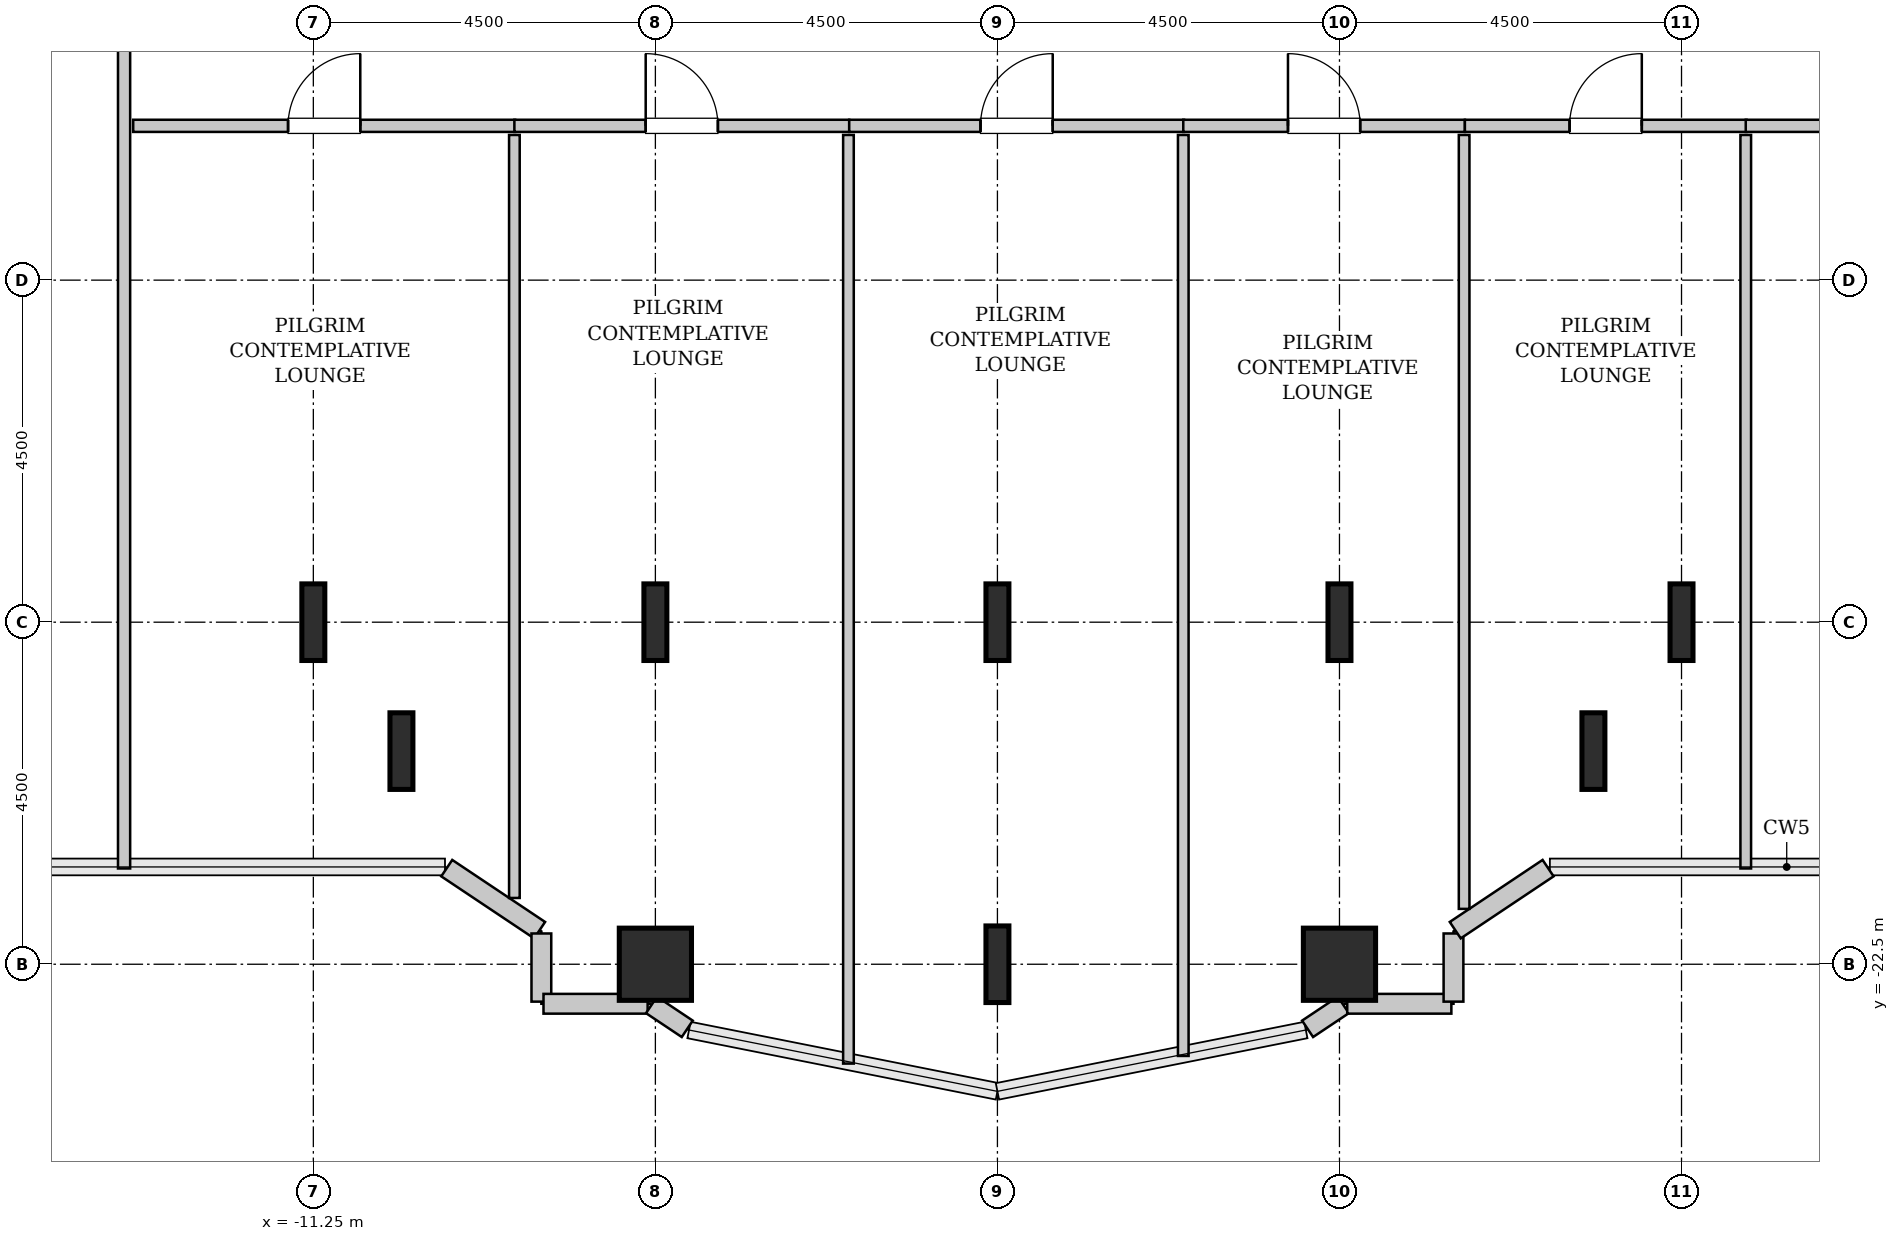
"""IFC4 building model, lengths in metres.
Left out: names, types, materials, properties, quantities, classifications, styles, units other than length and angle.
Written with IfcOpenShell. Run it as: python <this file> out.ifc"""

import sys

from ifc_helpers import new_model, si_unit, direction, frame, frame_2d, origin, origin_2d, place, context, subcontext, project, spatial, rectangle, hollow_rectangle, i_section, extrude, source, transform, mapped, element, fill, save


model = new_model("IFC4")
c1 = context("Model", 3, precision=1e-05, world=origin(), true_north=direction((0.0, 1.0)))
c2 = subcontext(c1, "Body", "Model", "MODEL_VIEW")
j1 = project(units=[si_unit("LENGTHUNIT", "METRE"), si_unit("PLANEANGLEUNIT", "RADIAN")], contexts=[c1])
p1 = place(None, origin())
s1 = spatial("IfcSite", under=j1, at=p1, CompositionType="ELEMENT")
p2 = place(p1, origin())
s2 = spatial("IfcBuilding", under=s1, at=p2, CompositionType="ELEMENT")
p3 = place(p2, frame((0.0, 0.0, 52.0)))
s3 = spatial("IfcBuildingStorey", under=s2, at=p3, CompositionType="ELEMENT", Elevation=52.0)
m1 = source(origin(), c2, "Body", "SweptSolid", [
    extrude(i_section(OverallWidth=0.302, OverallDepth=1.008, WebThickness=0.021, FlangeThickness=0.04, FilletRadius=0.03, at=origin_2d()), origin(), (0.0, 0.0, 1.0), 3.8),
])
for number, where, z_axis, x_axis in (
    (1, (-11.25, -18.0, 0.0), (0.0, 0.0, 1.0), (1.0, 0.0, 0.0)),
    (2, (-10.091, -19.696, 0.0), (0.0, 0.0, 1.0), (1.0, 0.0, 0.0)),
):
    element("IfcColumn", number, at=place(p3, frame(where, z_axis=z_axis, x_axis=x_axis)), inside=s3, PredefinedType="COLUMN", context=c2, shape_type="MappedRepresentation", body=[
        mapped(m1, transform((0.0, 0.0, 0.0), x_axis=(1.0, 0.0, 0.0), y_axis=(0.0, 1.0, 0.0), z_axis=(0.0, 0.0, 1.0), scale=1.0)),
    ])
m2 = source(origin(), c2, "Body", "SweptSolid", [
    extrude(hollow_rectangle(XDim=0.95, YDim=0.95, WallThickness=0.045, InnerFilletRadius=0.045, OuterFilletRadius=0.09, at=origin_2d()), origin(), (0.0, 0.0, 1.0), 3.8),
])
p4 = place(p3, frame((-6.75, -22.5, 0.0), z_axis=(0.0, 0.0, 1.0), x_axis=(1.0, 0.0, 0.0)))
e3 = element("IfcColumn", 3, at=p4, inside=s3, PredefinedType="COLUMN", context=c2, shape_type="MappedRepresentation", body=[
    mapped(m2, transform((0.0, 0.0, 0.0), x_axis=(1.0, 0.0, 0.0), y_axis=(0.0, 1.0, 0.0), z_axis=(0.0, 0.0, 1.0), scale=1.0)),
])
for number, where, z_axis, x_axis in (
    (4, (-6.75, -18.0, 0.0), (0.0, 0.0, 1.0), (1.0, 0.0, 0.0)),
    (5, (-2.25, -22.5, 0.0), (0.0, 0.0, 1.0), (1.0, 0.0, 0.0)),
    (6, (-2.25, -18.0, 0.0), (0.0, 0.0, 1.0), (1.0, 0.0, 0.0)),
):
    element("IfcColumn", number, at=place(p3, frame(where, z_axis=z_axis, x_axis=x_axis)), inside=s3, PredefinedType="COLUMN", context=c2, shape_type="MappedRepresentation", body=[
        mapped(m1, transform((0.0, 0.0, 0.0), x_axis=(1.0, 0.0, 0.0), y_axis=(0.0, 1.0, 0.0), z_axis=(0.0, 0.0, 1.0), scale=1.0)),
    ])
p5 = place(p3, frame((2.25, -22.5, 0.0), z_axis=(0.0, 0.0, 1.0), x_axis=(1.0, 0.0, 0.0)))
e7 = element("IfcColumn", 7, at=p5, inside=s3, PredefinedType="COLUMN", context=c2, shape_type="MappedRepresentation", body=[
    mapped(m2, transform((0.0, 0.0, 0.0), x_axis=(1.0, 0.0, 0.0), y_axis=(0.0, 1.0, 0.0), z_axis=(0.0, 0.0, 1.0), scale=1.0)),
])
for number, where, z_axis, x_axis in (
    (8, (2.25, -18.0, 0.0), (0.0, 0.0, 1.0), (1.0, 0.0, 0.0)),
    (9, (5.591, -19.696, 0.0), (0.0, 0.0, 1.0), (1.0, 0.0, 0.0)),
    (10, (6.75, -18.0, 0.0), (0.0, 0.0, 1.0), (1.0, 0.0, 0.0)),
):
    element("IfcColumn", number, at=place(p3, frame(where, z_axis=z_axis, x_axis=x_axis)), inside=s3, PredefinedType="COLUMN", context=c2, shape_type="MappedRepresentation", body=[
        mapped(m1, transform((0.0, 0.0, 0.0), x_axis=(1.0, 0.0, 0.0), y_axis=(0.0, 1.0, 0.0), z_axis=(0.0, 0.0, 1.0), scale=1.0)),
    ])
m3 = source(origin(), c2, "Body", "SweptSolid", [
    extrude(rectangle(XDim=1.469, YDim=0.26, at=frame_2d((0.734, 0.0))), origin(), (0.0, 0.0, 1.0), 3.55),
])
p6 = place(p3, frame((-9.495, -21.236, 0.0), z_axis=(0.0, 0.0, 1.0), x_axis=(0.831461760506, -0.555581983884, 0.0)))
e11 = element("IfcWall", 11, at=p6, inside=s3, PredefinedType="SOLIDWALL", context=c2, shape_type="MappedRepresentation", body=[
    mapped(m3, transform((0.0, 0.0, 0.0), x_axis=(1.0, 0.0, 0.0), y_axis=(0.0, 1.0, 0.0), z_axis=(0.0, 0.0, 1.0), scale=1.0)),
])
m4 = source(origin(), c2, "Body", "SweptSolid", [
    extrude(rectangle(XDim=0.897, YDim=0.26, at=frame_2d((0.448, 0.0))), origin(), (0.0, 0.0, 1.0), 3.55),
])
p7 = place(p3, frame((-8.25, -22.095, 0.0), z_axis=(0.0, 0.0, 1.0), x_axis=(0.0, -1.0, 0.0)))
e12 = element("IfcWall", 12, at=p7, inside=s3, PredefinedType="SOLIDWALL", context=c2, shape_type="MappedRepresentation", body=[
    mapped(m4, transform((0.0, 0.0, 0.0), x_axis=(1.0, 0.0, 0.0), y_axis=(0.0, 1.0, 0.0), z_axis=(0.0, 0.0, 1.0), scale=1.0)),
])
m5 = source(origin(), c2, "Body", "SweptSolid", [
    extrude(rectangle(XDim=1.37, YDim=0.26, at=frame_2d((0.685, 0.0))), origin(), (0.0, 0.0, 1.0), 3.55),
])
p8 = place(p3, frame((-8.222, -23.02, 0.0), z_axis=(0.0, 0.0, 1.0), x_axis=(1.0, 0.0, 0.0)))
e13 = element("IfcWall", 13, at=p8, inside=s3, PredefinedType="SOLIDWALL", context=c2, shape_type="MappedRepresentation", body=[
    mapped(m5, transform((0.0, 0.0, 0.0), x_axis=(1.0, 0.0, 0.0), y_axis=(0.0, 1.0, 0.0), z_axis=(0.0, 0.0, 1.0), scale=1.0)),
])
m6 = source(origin(), c2, "Body", "SweptSolid", [
    extrude(rectangle(XDim=0.565, YDim=0.26, at=frame_2d((0.283, 0.0))), origin(), (0.0, 0.0, 1.0), 3.55),
])
for number, where, z_axis, x_axis in (
    (14, (-6.801, -23.036, 0.0), (0.0, 0.0, 1.0), (0.832, -0.555, 0.0)),
    (15, (1.831, -23.35, 0.0), (0.0, 0.0, 1.0), (0.832, 0.555, 0.0)),
):
    element("IfcWall", number, at=place(p3, frame(where, z_axis=z_axis, x_axis=x_axis)), inside=s3, PredefinedType="SOLIDWALL", context=c2, shape_type="MappedRepresentation", body=[
        mapped(m6, transform((0.0, 0.0, 0.0), x_axis=(1.0, 0.0, 0.0), y_axis=(0.0, 1.0, 0.0), z_axis=(0.0, 0.0, 1.0), scale=1.0)),
    ])
p9 = place(p3, frame((2.352, -23.02, 0.0), z_axis=(0.0, 0.0, 1.0), x_axis=(1.0, 0.0, 0.0)))
e16 = element("IfcWall", 16, at=p9, inside=s3, PredefinedType="SOLIDWALL", context=c2, shape_type="MappedRepresentation", body=[
    mapped(m5, transform((0.0, 0.0, 0.0), x_axis=(1.0, 0.0, 0.0), y_axis=(0.0, 1.0, 0.0), z_axis=(0.0, 0.0, 1.0), scale=1.0)),
])
p10 = place(p3, frame((3.75, -22.992, 0.0), z_axis=(0.0, 0.0, 1.0), x_axis=(0.0, 1.0, 0.0)))
e17 = element("IfcWall", 17, at=p10, inside=s3, PredefinedType="SOLIDWALL", context=c2, shape_type="MappedRepresentation", body=[
    mapped(m4, transform((0.0, 0.0, 0.0), x_axis=(1.0, 0.0, 0.0), y_axis=(0.0, 1.0, 0.0), z_axis=(0.0, 0.0, 1.0), scale=1.0)),
])
p11 = place(p3, frame((3.773, -22.052, 0.0), z_axis=(0.0, 0.0, 1.0), x_axis=(0.831461760506, 0.555581983884, 0.0)))
e18 = element("IfcWall", 18, at=p11, inside=s3, PredefinedType="SOLIDWALL", context=c2, shape_type="MappedRepresentation", body=[
    mapped(m3, transform((0.0, 0.0, 0.0), x_axis=(1.0, 0.0, 0.0), y_axis=(0.0, 1.0, 0.0), z_axis=(0.0, 0.0, 1.0), scale=1.0)),
])
m7 = source(origin(), c2, "Body", "SweptSolid", [
    extrude(rectangle(XDim=12.745, YDim=0.16, at=frame_2d((6.373, 0.0))), origin(), (0.0, 0.0, 1.0), 3.535),
])
p12 = place(p3, frame((-13.74, -21.24, 0.0), z_axis=(0.0, 0.0, 1.0), x_axis=(0.0, 1.0, 0.0)))
e19 = element("IfcWall", 19, at=p12, inside=s3, PredefinedType="PARTITIONING", context=c2, shape_type="MappedRepresentation", body=[
    mapped(m7, transform((0.0, 0.0, 0.0), x_axis=(1.0, 0.0, 0.0), y_axis=(0.0, 1.0, 0.0), z_axis=(0.0, 0.0, 1.0), scale=1.0)),
])
p13 = place(p12, frame((10.762, 0.0, 0.0)))
e20 = element("IfcOpeningElement", 20, at=p13, cuts=e19, PredefinedType="OPENING", context=c2, shape_type="SweptSolid", body=[
    extrude(rectangle(XDim=0.95, YDim=2.1, at=frame_2d((0.475, 1.05))), frame((0.0, 0.09, 0.0), z_axis=(0.0, -1.0, 0.0), x_axis=(1.0, 0.0, 0.0)), (0.0, 0.0, 1.0), 0.18),
])
m8 = source(origin(), c2, "Body", "SweptSolid", [
    extrude(rectangle(XDim=5.025, YDim=0.16, at=frame_2d((2.513, 0.0))), origin(), (0.0, 0.0, 1.0), 3.535),
])
p14 = place(p3, frame((-13.62, -11.47, 0.0), z_axis=(0.0, 0.0, 1.0), x_axis=(1.0, 0.0, 0.0)))
e21 = element("IfcWall", 21, at=p14, inside=s3, PredefinedType="PARTITIONING", context=c2, shape_type="MappedRepresentation", body=[
    mapped(m8, transform((0.0, 0.0, 0.0), x_axis=(1.0, 0.0, 0.0), y_axis=(0.0, 1.0, 0.0), z_axis=(0.0, 0.0, 1.0), scale=1.0)),
])
p15 = place(p14, frame((2.038, 0.0, 0.0)))
e22 = element("IfcOpeningElement", 22, at=p15, cuts=e21, PredefinedType="OPENING", context=c2, shape_type="SweptSolid", body=[
    extrude(rectangle(XDim=0.95, YDim=2.1, at=frame_2d((0.475, 1.05))), frame((0.0, 0.09, 0.0), z_axis=(0.0, -1.0, 0.0), x_axis=(1.0, 0.0, 0.0)), (0.0, 0.0, 1.0), 0.18),
])
m9 = source(origin(), c2, "Body", "SweptSolid", [
    extrude(rectangle(XDim=10.038, YDim=0.14, at=frame_2d((5.019, 0.0))), origin(), (0.0, 0.0, 1.0), 3.535),
])
p16 = place(p3, frame((-8.605, -21.628, 0.0), z_axis=(0.0, 0.0, 1.0), x_axis=(0.0, 1.0, 0.0)))
e23 = element("IfcWall", 23, at=p16, inside=s3, PredefinedType="PARTITIONING", context=c2, shape_type="MappedRepresentation", body=[
    mapped(m9, transform((0.0, 0.0, 0.0), x_axis=(1.0, 0.0, 0.0), y_axis=(0.0, 1.0, 0.0), z_axis=(0.0, 0.0, 1.0), scale=1.0)),
])
m10 = source(origin(), c2, "Body", "SweptSolid", [
    extrude(rectangle(XDim=4.405, YDim=0.16, at=frame_2d((2.203, 0.0))), origin(), (0.0, 0.0, 1.0), 3.535),
])
p17 = place(p3, frame((-8.605, -11.47, 0.0), z_axis=(0.0, 0.0, 1.0), x_axis=(1.0, 0.0, 0.0)))
e24 = element("IfcWall", 24, at=p17, inside=s3, PredefinedType="PARTITIONING", context=c2, shape_type="MappedRepresentation", body=[
    mapped(m10, transform((0.0, 0.0, 0.0), x_axis=(1.0, 0.0, 0.0), y_axis=(0.0, 1.0, 0.0), z_axis=(0.0, 0.0, 1.0), scale=1.0)),
])
p18 = place(p17, frame((1.728, 0.0, 0.0)))
e25 = element("IfcOpeningElement", 25, at=p18, cuts=e24, PredefinedType="OPENING", context=c2, shape_type="SweptSolid", body=[
    extrude(rectangle(XDim=0.95, YDim=2.1, at=frame_2d((0.475, 1.05))), frame((0.0, 0.09, 0.0), z_axis=(0.0, -1.0, 0.0), x_axis=(1.0, 0.0, 0.0)), (0.0, 0.0, 1.0), 0.18),
])
m11 = source(origin(), c2, "Body", "SweptSolid", [
    extrude(rectangle(XDim=12.217, YDim=0.14, at=frame_2d((6.108, 0.0))), origin(), (0.0, 0.0, 1.0), 3.535),
])
p19 = place(p3, frame((-4.21, -23.807, 0.0), z_axis=(0.0, 0.0, 1.0), x_axis=(0.0, 1.0, 0.0)))
e26 = element("IfcWall", 26, at=p19, inside=s3, PredefinedType="PARTITIONING", context=c2, shape_type="MappedRepresentation", body=[
    mapped(m11, transform((0.0, 0.0, 0.0), x_axis=(1.0, 0.0, 0.0), y_axis=(0.0, 1.0, 0.0), z_axis=(0.0, 0.0, 1.0), scale=1.0)),
])
p20 = place(p3, frame((-4.2, -11.47, 0.0), z_axis=(0.0, 0.0, 1.0), x_axis=(1.0, 0.0, 0.0)))
e27 = element("IfcWall", 27, at=p20, inside=s3, PredefinedType="PARTITIONING", context=c2, shape_type="MappedRepresentation", body=[
    mapped(m10, transform((0.0, 0.0, 0.0), x_axis=(1.0, 0.0, 0.0), y_axis=(0.0, 1.0, 0.0), z_axis=(0.0, 0.0, 1.0), scale=1.0)),
])
p21 = place(p20, frame((1.728, 0.0, 0.0)))
e28 = element("IfcOpeningElement", 28, at=p21, cuts=e27, PredefinedType="OPENING", context=c2, shape_type="SweptSolid", body=[
    extrude(rectangle(XDim=0.95, YDim=2.1, at=frame_2d((0.475, 1.05))), frame((0.0, 0.09, 0.0), z_axis=(0.0, -1.0, 0.0), x_axis=(1.0, 0.0, 0.0)), (0.0, 0.0, 1.0), 0.18),
])
m12 = source(origin(), c2, "Body", "SweptSolid", [
    extrude(rectangle(XDim=12.116, YDim=0.14, at=frame_2d((6.058, 0.0))), origin(), (0.0, 0.0, 1.0), 3.535),
])
p22 = place(p3, frame((0.195, -23.706, 0.0), z_axis=(0.0, 0.0, 1.0), x_axis=(0.0, 1.0, 0.0)))
e29 = element("IfcWall", 29, at=p22, inside=s3, PredefinedType="PARTITIONING", context=c2, shape_type="MappedRepresentation", body=[
    mapped(m12, transform((0.0, 0.0, 0.0), x_axis=(1.0, 0.0, 0.0), y_axis=(0.0, 1.0, 0.0), z_axis=(0.0, 0.0, 1.0), scale=1.0)),
])
m13 = source(origin(), c2, "Body", "SweptSolid", [
    extrude(rectangle(XDim=3.705, YDim=0.16, at=frame_2d((1.853, 0.0))), origin(), (0.0, 0.0, 1.0), 3.535),
])
p23 = place(p3, frame((0.195, -11.47, 0.0), z_axis=(0.0, 0.0, 1.0), x_axis=(1.0, 0.0, 0.0)))
e30 = element("IfcWall", 30, at=p23, inside=s3, PredefinedType="PARTITIONING", context=c2, shape_type="MappedRepresentation", body=[
    mapped(m13, transform((0.0, 0.0, 0.0), x_axis=(1.0, 0.0, 0.0), y_axis=(0.0, 1.0, 0.0), z_axis=(0.0, 0.0, 1.0), scale=1.0)),
])
p24 = place(p23, frame((1.377, 0.0, 0.0)))
e31 = element("IfcOpeningElement", 31, at=p24, cuts=e30, PredefinedType="OPENING", context=c2, shape_type="SweptSolid", body=[
    extrude(rectangle(XDim=0.95, YDim=2.1, at=frame_2d((0.475, 1.05))), frame((0.0, 0.09, 0.0), z_axis=(0.0, -1.0, 0.0), x_axis=(1.0, 0.0, 0.0)), (0.0, 0.0, 1.0), 0.18),
])
m14 = source(origin(), c2, "Body", "SweptSolid", [
    extrude(rectangle(XDim=10.182, YDim=0.14, at=frame_2d((5.091, 0.0))), origin(), (0.0, 0.0, 1.0), 3.535),
])
p25 = place(p3, frame((3.89, -21.772, 0.0), z_axis=(0.0, 0.0, 1.0), x_axis=(0.0, 1.0, 0.0)))
e32 = element("IfcWall", 32, at=p25, inside=s3, PredefinedType="PARTITIONING", context=c2, shape_type="MappedRepresentation", body=[
    mapped(m14, transform((0.0, 0.0, 0.0), x_axis=(1.0, 0.0, 0.0), y_axis=(0.0, 1.0, 0.0), z_axis=(0.0, 0.0, 1.0), scale=1.0)),
])
m15 = source(origin(), c2, "Body", "SweptSolid", [
    extrude(rectangle(XDim=3.705, YDim=0.16, at=frame_2d((1.853, 0.0))), origin(), (0.0, 0.0, 1.0), 3.535),
])
p26 = place(p3, frame((3.9, -11.47, 0.0), z_axis=(0.0, 0.0, 1.0), x_axis=(1.0, 0.0, 0.0)))
e33 = element("IfcWall", 33, at=p26, inside=s3, PredefinedType="PARTITIONING", context=c2, shape_type="MappedRepresentation", body=[
    mapped(m15, transform((0.0, 0.0, 0.0), x_axis=(1.0, 0.0, 0.0), y_axis=(0.0, 1.0, 0.0), z_axis=(0.0, 0.0, 1.0), scale=1.0)),
])
p27 = place(p26, frame((1.377, 0.0, 0.0)))
e34 = element("IfcOpeningElement", 34, at=p27, cuts=e33, PredefinedType="OPENING", context=c2, shape_type="SweptSolid", body=[
    extrude(rectangle(XDim=0.95, YDim=2.1, at=frame_2d((0.475, 1.05))), frame((0.0, 0.09, 0.0), z_axis=(0.0, -1.0, 0.0), x_axis=(1.0, 0.0, 0.0)), (0.0, 0.0, 1.0), 0.18),
])
m16 = source(origin(), c2, "Body", "SweptSolid", [
    extrude(rectangle(XDim=9.65, YDim=0.14, at=frame_2d((4.825, 0.0))), origin(), (0.0, 0.0, 1.0), 3.535),
])
p28 = place(p3, frame((7.595, -21.24, 0.0), z_axis=(0.0, 0.0, 1.0), x_axis=(0.0, 1.0, 0.0)))
e35 = element("IfcWall", 35, at=p28, inside=s3, PredefinedType="PARTITIONING", context=c2, shape_type="MappedRepresentation", body=[
    mapped(m16, transform((0.0, 0.0, 0.0), x_axis=(1.0, 0.0, 0.0), y_axis=(0.0, 1.0, 0.0), z_axis=(0.0, 0.0, 1.0), scale=1.0)),
])
m17 = source(origin(), c2, "Body", "SweptSolid", [
    extrude(rectangle(XDim=6.025, YDim=0.16, at=frame_2d((3.013, 0.0))), origin(), (0.0, 0.0, 1.0), 3.535),
])
p29 = place(p3, frame((7.595, -11.47, 0.0), z_axis=(0.0, 0.0, 1.0), x_axis=(1.0, 0.0, 0.0)))
e36 = element("IfcWall", 36, at=p29, inside=s3, PredefinedType="PARTITIONING", context=c2, shape_type="MappedRepresentation", body=[
    mapped(m17, transform((0.0, 0.0, 0.0), x_axis=(1.0, 0.0, 0.0), y_axis=(0.0, 1.0, 0.0), z_axis=(0.0, 0.0, 1.0), scale=1.0)),
])
p30 = place(p29, frame((2.538, 0.0, 0.0)))
e37 = element("IfcOpeningElement", 37, at=p30, cuts=e36, PredefinedType="OPENING", context=c2, shape_type="SweptSolid", body=[
    extrude(rectangle(XDim=0.95, YDim=2.1, at=frame_2d((0.475, 1.05))), frame((0.0, 0.09, 0.0), z_axis=(0.0, -1.0, 0.0), x_axis=(1.0, 0.0, 0.0)), (0.0, 0.0, 1.0), 0.18),
])
m18 = source(origin(), c2, "Body", "SweptSolid", [
    extrude(rectangle(XDim=0.95, YDim=2.1, at=frame_2d((0.475, 1.05))), frame((0.0, 0.025, 0.0), z_axis=(0.0, -1.0, 0.0), x_axis=(1.0, 0.0, 0.0)), (0.0, 0.0, 1.0), 0.05),
])
p31 = place(p15, origin())
e38 = element("IfcDoor", 38, at=p31, inside=s3, OperationType="SINGLE_SWING_RIGHT", PredefinedType="DOOR", context=c2, shape_type="MappedRepresentation", body=[
    mapped(m18, transform((0.0, 0.0, 0.0), x_axis=(1.0, 0.0, 0.0), y_axis=(0.0, 1.0, 0.0), z_axis=(0.0, 0.0, 1.0), scale=1.0)),
])
fill(e22, e38)
p32 = place(p18, origin())
e39 = element("IfcDoor", 39, at=p32, inside=s3, OperationType="SINGLE_SWING_LEFT", PredefinedType="DOOR", context=c2, shape_type="MappedRepresentation", body=[
    mapped(m18, transform((0.0, 0.0, 0.0), x_axis=(1.0, 0.0, 0.0), y_axis=(0.0, 1.0, 0.0), z_axis=(0.0, 0.0, 1.0), scale=1.0)),
])
fill(e25, e39)
p33 = place(p21, origin())
e40 = element("IfcDoor", 40, at=p33, inside=s3, OperationType="SINGLE_SWING_RIGHT", PredefinedType="DOOR", context=c2, shape_type="MappedRepresentation", body=[
    mapped(m18, transform((0.0, 0.0, 0.0), x_axis=(1.0, 0.0, 0.0), y_axis=(0.0, 1.0, 0.0), z_axis=(0.0, 0.0, 1.0), scale=1.0)),
])
fill(e28, e40)
p34 = place(p24, origin())
e41 = element("IfcDoor", 41, at=p34, inside=s3, OperationType="SINGLE_SWING_LEFT", PredefinedType="DOOR", context=c2, shape_type="MappedRepresentation", body=[
    mapped(m18, transform((0.0, 0.0, 0.0), x_axis=(1.0, 0.0, 0.0), y_axis=(0.0, 1.0, 0.0), z_axis=(0.0, 0.0, 1.0), scale=1.0)),
])
fill(e31, e41)
p35 = place(p27, origin())
e42 = element("IfcDoor", 42, at=p35, inside=s3, OperationType="SINGLE_SWING_RIGHT", PredefinedType="DOOR", context=c2, shape_type="MappedRepresentation", body=[
    mapped(m18, transform((0.0, 0.0, 0.0), x_axis=(1.0, 0.0, 0.0), y_axis=(0.0, 1.0, 0.0), z_axis=(0.0, 0.0, 1.0), scale=1.0)),
])
fill(e34, e42)
save(model, sys.argv[1])
